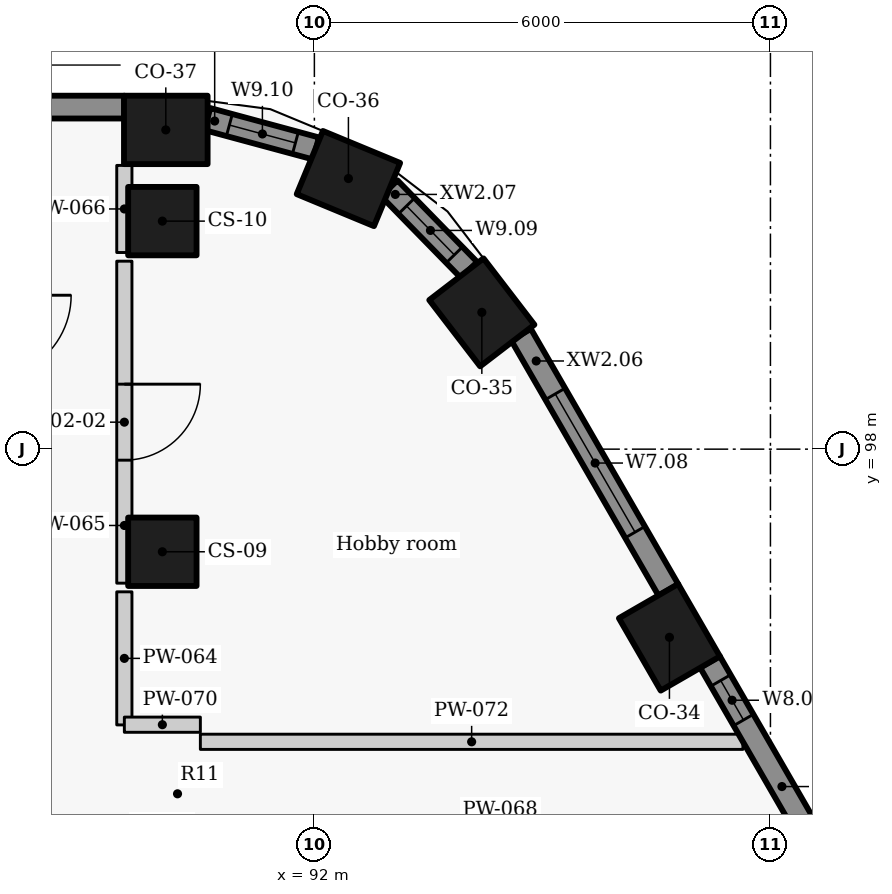
"""IFC4 building model, lengths in metres.
Left out: names, types, materials, properties, quantities, classifications, styles, units other than length and angle.
Written with IfcOpenShell. Run it as: python <this file> out.ifc"""

import sys

from ifc_helpers import new_model, si_unit, direction, frame, frame_2d, origin, origin_2d, place, context, subcontext, project, spatial, rectangle, extrude, element, fill, save


model = new_model("IFC4")
c1 = context("Model", 3, precision=1e-05, world=origin(), true_north=direction((0.0, 1.0)))
c2 = subcontext(c1, "Body", "Model", "MODEL_VIEW")
j1 = project(units=[si_unit("LENGTHUNIT", "METRE"), si_unit("PLANEANGLEUNIT", "RADIAN")], contexts=[c1])
p1 = place(None, origin())
s1 = spatial("IfcSite", under=j1, at=p1, CompositionType="ELEMENT")
p2 = place(p1, origin())
s2 = spatial("IfcBuilding", under=s1, at=p2, CompositionType="ELEMENT")
p3 = place(p2, frame((0.0, 0.0, 229.5)))
s3 = spatial("IfcBuildingStorey", under=s2, at=p3, CompositionType="ELEMENT", Elevation=229.5)
for number, where, z_axis, x_axis in (
    (1, (96.671, 95.525, 0.0), (0.0, 0.0, 1.0), (-0.5, 0.866, 0.0)),
    (2, (94.203, 99.8, 0.0), (0.0, 0.0, 1.0), (-0.609, 0.793, 0.0)),
    (3, (92.448, 101.56, 0.0), (0.0, 0.0, 1.0), (-0.924, 0.383, 0.0)),
    (4, (90.045, 102.2, 0.0), (0.0, 0.0, 1.0), (-1.0, 0.0, 0.0)),
):
    element("IfcColumn", number, at=place(p3, frame(where, z_axis=z_axis, x_axis=x_axis)), inside=s3, PredefinedType="COLUMN", context=c2, shape_type="SweptSolid", body=[
        extrude(rectangle(XDim=1.1, YDim=0.9, at=origin_2d()), origin(), (0.0, 0.0, 1.0), 3.3),
    ])
for number, where, z_axis, x_axis in (
    (5, (90.0, 96.65, 0.0), (0.0, 0.0, 1.0), (0.0, 1.0, 0.0)),
    (6, (90.0, 101.0, 0.0), (0.0, 0.0, 1.0), (0.0, 1.0, 0.0)),
):
    element("IfcColumn", number, at=place(p3, frame(where, z_axis=z_axis, x_axis=x_axis)), inside=s3, PredefinedType="COLUMN", context=c2, shape_type="SweptSolid", body=[
        extrude(rectangle(XDim=0.9, YDim=0.9, at=origin_2d()), origin(), (0.0, 0.0, 1.0), 3.3),
    ])
p4 = place(p3, frame((99.126, 91.873, 0.0), z_axis=(0.0, 0.0, 1.0), x_axis=(-0.499984490703, 0.866034357896, 0.0)))
e7 = element("IfcWall", 7, at=p4, inside=s3, PredefinedType="SOLIDWALL", context=c2, shape_type="SweptSolid", body=[
    extrude(rectangle(XDim=3.844, YDim=0.3, at=frame_2d((1.922, 0.0))), origin(), (0.0, 0.0, 1.0), 2.425),
])
p5 = place(p4, frame((0.338, 0.0, 0.9)))
e8 = element("IfcOpeningElement", 8, at=p5, cuts=e7, PredefinedType="OPENING", context=c2, shape_type="SweptSolid", body=[
    extrude(rectangle(XDim=0.6, YDim=1.1, at=frame_2d((0.3, 0.55))), frame((0.0, 0.16, 0.0), z_axis=(0.0, -1.0, 0.0), x_axis=(1.0, 0.0, 0.0)), (0.0, 0.0, 1.0), 0.32),
])
p6 = place(p4, frame((2.961, 0.0, 0.9)))
e9 = element("IfcOpeningElement", 9, at=p6, cuts=e7, PredefinedType="OPENING", context=c2, shape_type="SweptSolid", body=[
    extrude(rectangle(XDim=0.6, YDim=1.1, at=frame_2d((0.3, 0.55))), frame((0.0, 0.16, 0.0), z_axis=(0.0, -1.0, 0.0), x_axis=(1.0, 0.0, 0.0)), (0.0, 0.0, 1.0), 0.32),
])
p7 = place(p3, frame((96.658, 96.147, 0.0), z_axis=(0.0, 0.0, 1.0), x_axis=(-0.500011218404, 0.866018926739, 0.0)))
e10 = element("IfcWall", 10, at=p7, inside=s3, PredefinedType="SOLIDWALL", context=c2, shape_type="SweptSolid", body=[
    extrude(rectangle(XDim=3.879, YDim=0.3, at=frame_2d((1.939, 0.0))), origin(), (0.0, 0.0, 1.0), 2.425),
])
p8 = place(p7, frame((0.878, 0.0, 0.9)))
e11 = element("IfcOpeningElement", 11, at=p8, cuts=e10, PredefinedType="OPENING", context=c2, shape_type="SweptSolid", body=[
    extrude(rectangle(XDim=2.1, YDim=1.1, at=frame_2d((1.05, 0.55))), frame((0.0, 0.16, 0.0), z_axis=(0.0, -1.0, 0.0), x_axis=(1.0, 0.0, 0.0)), (0.0, 0.0, 1.0), 0.32),
])
p9 = place(p3, frame((94.034, 100.358, 0.0), z_axis=(0.0, 0.0, 1.0), x_axis=(-0.698675602211, 0.71543860874, 0.0)))
e12 = element("IfcWall", 12, at=p9, inside=s3, PredefinedType="SOLIDWALL", context=c2, shape_type="SweptSolid", body=[
    extrude(rectangle(XDim=1.5, YDim=0.3, at=frame_2d((0.75, 0.0))), origin(), (0.0, 0.0, 1.0), 2.425),
])
p10 = place(p9, frame((0.276, 0.0, 0.9)))
e13 = element("IfcOpeningElement", 13, at=p10, cuts=e12, PredefinedType="OPENING", context=c2, shape_type="SweptSolid", body=[
    extrude(rectangle(XDim=0.9, YDim=1.1, at=frame_2d((0.45, 0.55))), frame((0.0, 0.16, 0.0), z_axis=(0.0, -1.0, 0.0), x_axis=(1.0, 0.0, 0.0)), (0.0, 0.0, 1.0), 0.32),
])
p11 = place(p3, frame((92.021, 101.956, 0.0), z_axis=(0.0, 0.0, 1.0), x_axis=(-0.965392564919, 0.260801065181, 0.0)))
e14 = element("IfcWall", 14, at=p11, inside=s3, PredefinedType="SOLIDWALL", context=c2, shape_type="SweptSolid", body=[
    extrude(rectangle(XDim=1.481, YDim=0.3, at=frame_2d((0.74, 0.0))), origin(), (0.0, 0.0, 1.0), 2.425),
])
p12 = place(p11, frame((0.28, 0.0, 0.9)))
e15 = element("IfcOpeningElement", 15, at=p12, cuts=e14, PredefinedType="OPENING", context=c2, shape_type="SweptSolid", body=[
    extrude(rectangle(XDim=0.9, YDim=1.1, at=frame_2d((0.45, 0.55))), frame((0.0, 0.16, 0.0), z_axis=(0.0, -1.0, 0.0), x_axis=(1.0, 0.0, 0.0)), (0.0, 0.0, 1.0), 0.32),
])
p13 = place(p3, frame((89.499, 102.5, 0.0), z_axis=(0.0, 0.0, 1.0), x_axis=(-1.0, 0.0, 0.0)))
e16 = element("IfcWall", 16, at=p13, inside=s3, PredefinedType="SOLIDWALL", context=c2, shape_type="SweptSolid", body=[
    extrude(rectangle(XDim=19.033, YDim=0.3, at=frame_2d((9.517, 0.0))), origin(), (0.0, 0.0, 1.0), 2.425),
])
p14 = place(p3, frame((89.5, 94.372, 0.0), z_axis=(0.0, 0.0, 1.0), x_axis=(0.0, 1.0, 0.0)))
e17 = element("IfcWall", 17, at=p14, inside=s3, PredefinedType="PARTITIONING", context=c2, shape_type="SweptSolid", body=[
    extrude(rectangle(XDim=1.751, YDim=0.2, at=frame_2d((0.875, 0.0))), origin(), (0.0, 0.0, 1.0), 3.025),
])
p15 = place(p3, frame((89.5, 100.473, 0.0), z_axis=(0.0, 0.0, 1.0), x_axis=(0.0, -1.0, 0.0)))
e18 = element("IfcWall", 18, at=p15, inside=s3, PredefinedType="PARTITIONING", context=c2, shape_type="SweptSolid", body=[
    extrude(rectangle(XDim=4.236, YDim=0.2, at=frame_2d((2.118, 0.0))), origin(), (0.0, 0.0, 1.0), 3.025),
])
p16 = place(p15, frame((1.618, 0.0, 0.0)))
e19 = element("IfcOpeningElement", 19, at=p16, cuts=e18, PredefinedType="OPENING", context=c2, shape_type="SweptSolid", body=[
    extrude(rectangle(XDim=1.0, YDim=2.1, at=frame_2d((0.5, 1.05))), frame((0.0, 0.11, 0.0), z_axis=(0.0, -1.0, 0.0), x_axis=(1.0, 0.0, 0.0)), (0.0, 0.0, 1.0), 0.22),
])
p17 = place(p3, frame((89.5, 100.587, 0.0), z_axis=(0.0, 0.0, 1.0), x_axis=(0.0, 1.0, 0.0)))
e20 = element("IfcWall", 20, at=p17, inside=s3, PredefinedType="PARTITIONING", context=c2, shape_type="SweptSolid", body=[
    extrude(rectangle(XDim=1.146, YDim=0.2, at=frame_2d((0.573, 0.0))), origin(), (0.0, 0.0, 1.0), 3.025),
])
p18 = place(p3, frame((89.5, 94.375, 0.0), z_axis=(0.0, 0.0, 1.0), x_axis=(1.0, 0.0, 0.0)))
e21 = element("IfcWall", 21, at=p18, inside=s3, PredefinedType="PARTITIONING", context=c2, shape_type="SweptSolid", body=[
    extrude(rectangle(XDim=1.0, YDim=0.2, at=frame_2d((0.5, 0.0))), origin(), (0.0, 0.0, 1.0), 2.505),
])
p19 = place(p3, frame((90.5, 94.15, 0.0), z_axis=(0.0, 0.0, 1.0), x_axis=(1.0, 0.0, 0.0)))
e22 = element("IfcWall", 22, at=p19, inside=s3, PredefinedType="PARTITIONING", context=c2, shape_type="SweptSolid", body=[
    extrude(rectangle(XDim=7.138, YDim=0.2, at=frame_2d((3.569, 0.0))), origin(), (0.0, 0.0, 1.0), 2.405),
])
p20 = place(p6, origin())
e23 = element("IfcWindow", 23, at=p20, inside=s3, PartitioningType="SINGLE_PANEL", PredefinedType="WINDOW", context=c2, shape_type="SweptSolid", body=[
    extrude(rectangle(XDim=0.6, YDim=1.1, at=frame_2d((0.3, 0.55))), frame((0.0, 0.03, 0.0), z_axis=(0.0, -1.0, 0.0), x_axis=(1.0, 0.0, 0.0)), (0.0, 0.0, 1.0), 0.06),
])
fill(e9, e23)
p21 = place(p8, origin())
e24 = element("IfcWindow", 24, at=p21, inside=s3, PartitioningType="SINGLE_PANEL", PredefinedType="WINDOW", context=c2, shape_type="SweptSolid", body=[
    extrude(rectangle(XDim=2.1, YDim=1.1, at=frame_2d((1.05, 0.55))), frame((0.0, 0.03, 0.0), z_axis=(0.0, -1.0, 0.0), x_axis=(1.0, 0.0, 0.0)), (0.0, 0.0, 1.0), 0.06),
])
fill(e11, e24)
p22 = place(p10, origin())
e25 = element("IfcWindow", 25, at=p22, inside=s3, PartitioningType="SINGLE_PANEL", PredefinedType="WINDOW", context=c2, shape_type="SweptSolid", body=[
    extrude(rectangle(XDim=0.9, YDim=1.1, at=frame_2d((0.45, 0.55))), frame((0.0, 0.03, 0.0), z_axis=(0.0, -1.0, 0.0), x_axis=(1.0, 0.0, 0.0)), (0.0, 0.0, 1.0), 0.06),
])
fill(e13, e25)
p23 = place(p12, origin())
e26 = element("IfcWindow", 26, at=p23, inside=s3, PartitioningType="SINGLE_PANEL", PredefinedType="WINDOW", context=c2, shape_type="SweptSolid", body=[
    extrude(rectangle(XDim=0.9, YDim=1.1, at=frame_2d((0.45, 0.55))), frame((0.0, 0.03, 0.0), z_axis=(0.0, -1.0, 0.0), x_axis=(1.0, 0.0, 0.0)), (0.0, 0.0, 1.0), 0.06),
])
fill(e15, e26)
p24 = place(p16, origin())
e27 = element("IfcDoor", 27, at=p24, inside=s3, OperationType="SINGLE_SWING_LEFT", PredefinedType="DOOR", context=c2, shape_type="SweptSolid", body=[
    extrude(rectangle(XDim=1.0, YDim=2.1, at=frame_2d((0.5, 1.05))), frame((0.0, 0.025, 0.0), z_axis=(0.0, -1.0, 0.0), x_axis=(1.0, 0.0, 0.0)), (0.0, 0.0, 1.0), 0.05),
])
fill(e19, e27)
save(model, sys.argv[1])
